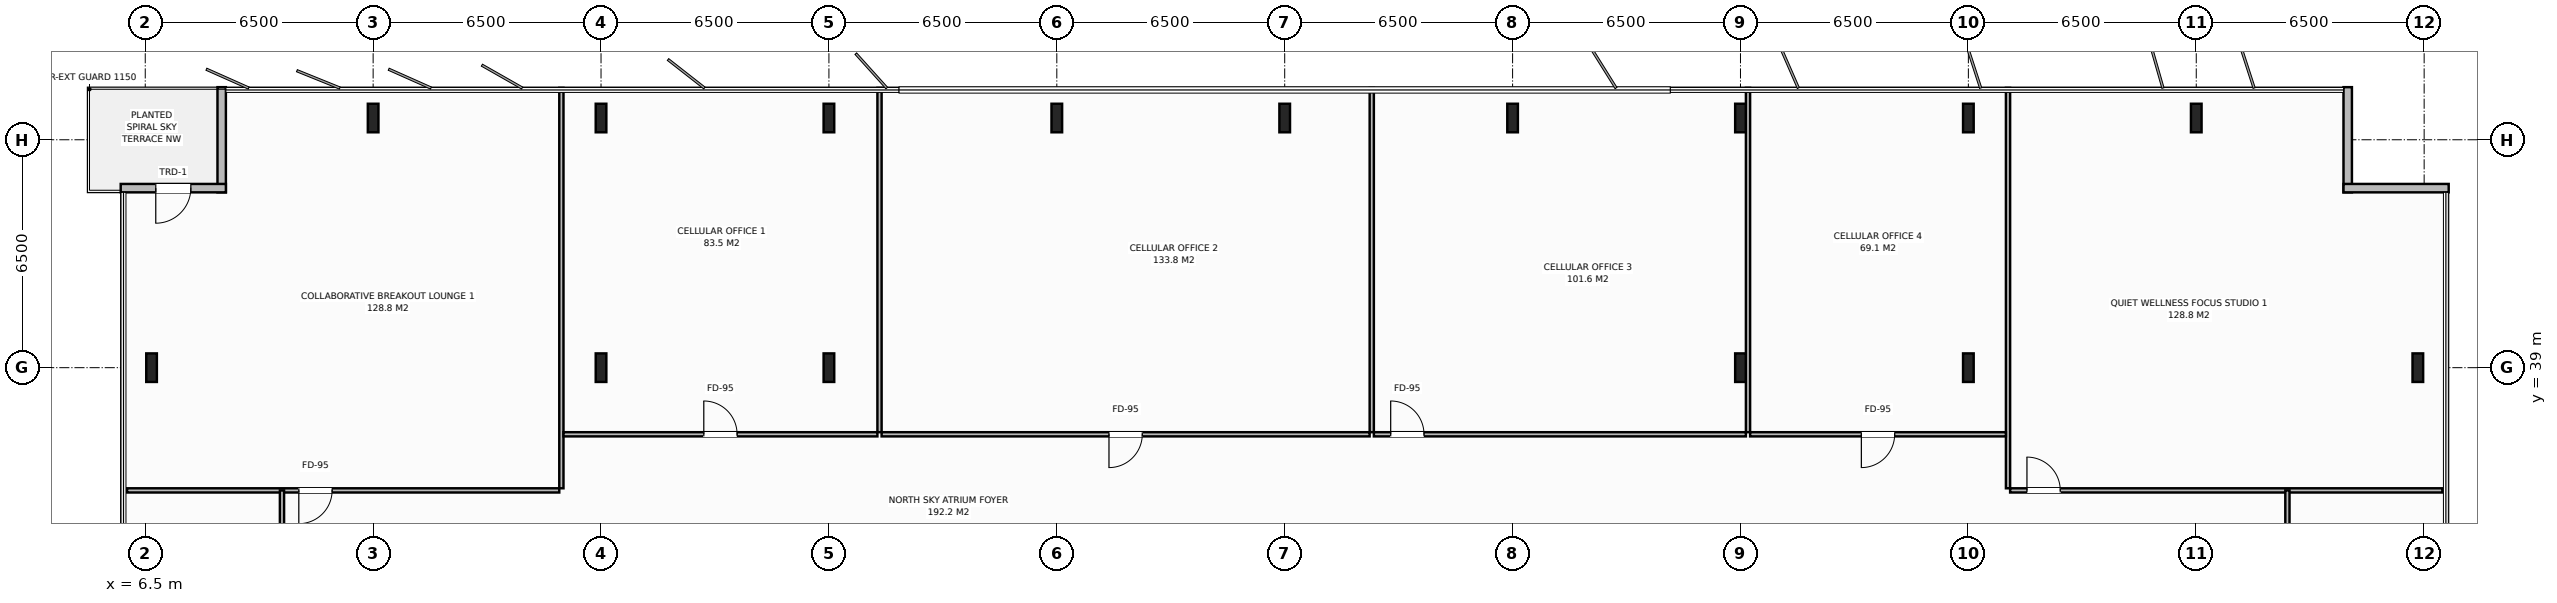
"""IFC4 building model, lengths in metres.
Left out: names, types, materials, properties, quantities, classifications, styles, units other than length and angle.
Written with IfcOpenShell. Run it as: python <this file> out.ifc"""

import sys

from ifc_helpers import new_model, si_unit, direction, frame, frame_2d, origin, origin_2d, place, context, subcontext, project, spatial, rectangle, i_section, extrude, element, fill, save


model = new_model("IFC4")
c1 = context("Model", 3, precision=1e-05, world=origin(), true_north=direction((0.0, 1.0)))
c2 = subcontext(c1, "Body", "Model", "MODEL_VIEW")
j1 = project(units=[si_unit("LENGTHUNIT", "METRE"), si_unit("PLANEANGLEUNIT", "RADIAN")], contexts=[c1])
p1 = place(None, origin())
s1 = spatial("IfcSite", under=j1, at=p1, CompositionType="ELEMENT")
p2 = place(p1, origin())
s2 = spatial("IfcBuilding", under=s1, at=p2, CompositionType="ELEMENT")
p3 = place(p2, frame((0.0, 0.0, 213.8)))
s3 = spatial("IfcBuildingStorey", under=s2, at=p3, CompositionType="ELEMENT", Elevation=213.8)
for number, where, z_axis, x_axis in (
    (1, (19.5, 39.0, 0.0), (0.0, 0.0, 1.0), (1.0, 0.0, 0.0)),
    (2, (58.5, 39.0, 0.0), (0.0, 0.0, 1.0), (1.0, 0.0, 0.0)),
    (3, (26.0, 39.0, 0.0), (0.0, 0.0, 1.0), (1.0, 0.0, 0.0)),
    (4, (52.0, 39.0, 0.0), (0.0, 0.0, 1.0), (1.0, 0.0, 0.0)),
    (5, (13.0, 46.12, 0.0), (0.0, 0.0, 1.0), (1.0, 0.0, 0.0)),
    (6, (19.5, 46.12, 0.0), (0.0, 0.0, 1.0), (1.0, 0.0, 0.0)),
    (7, (26.0, 46.12, 0.0), (0.0, 0.0, 1.0), (1.0, 0.0, 0.0)),
    (8, (32.5, 46.12, 0.0), (0.0, 0.0, 1.0), (1.0, 0.0, 0.0)),
    (9, (39.0, 46.12, 0.0), (0.0, 0.0, 1.0), (1.0, 0.0, 0.0)),
    (10, (45.5, 46.12, 0.0), (0.0, 0.0, 1.0), (1.0, 0.0, 0.0)),
    (11, (52.0, 46.12, 0.0), (0.0, 0.0, 1.0), (1.0, 0.0, 0.0)),
    (12, (58.5, 46.12, 0.0), (0.0, 0.0, 1.0), (1.0, 0.0, 0.0)),
    (13, (65.0, 46.12, 0.0), (0.0, 0.0, 1.0), (1.0, 0.0, 0.0)),
    (14, (6.68, 39.0, 0.0), (0.0, 0.0, 1.0), (1.0, 0.0, 0.0)),
    (15, (71.32, 39.0, 0.0), (0.0, 0.0, 1.0), (1.0, 0.0, 0.0)),
):
    element("IfcColumn", number, at=place(p3, frame(where, z_axis=z_axis, x_axis=x_axis)), inside=s3, PredefinedType="COLUMN", context=c2, shape_type="SweptSolid", body=[
        extrude(i_section(OverallWidth=0.303, OverallDepth=0.814, WebThickness=0.021, FlangeThickness=0.04, at=origin_2d()), origin(), (0.0, 0.0, 1.0), 3.8),
    ])
p4 = place(p3, frame((8.68, 44.0, 0.0), z_axis=(0.0, 0.0, 1.0), x_axis=(0.0, 1.0, 0.0)))
e16 = element("IfcWall", 16, at=p4, inside=s3, PredefinedType="STANDARD", context=c2, shape_type="SweptSolid", body=[
    extrude(rectangle(XDim=3.0, YDim=0.24, at=frame_2d((1.5, 0.0))), origin(), (0.0, 0.0, 1.0), 3.58),
])
p5 = place(p3, frame((5.8, 44.12, 0.0), z_axis=(0.0, 0.0, 1.0), x_axis=(1.0, 0.0, 0.0)))
e17 = element("IfcWall", 17, at=p5, inside=s3, PredefinedType="STANDARD", context=c2, shape_type="SweptSolid", body=[
    extrude(rectangle(XDim=3.0, YDim=0.24, at=frame_2d((1.5, 0.0))), origin(), (0.0, 0.0, 1.0), 3.58),
])
p6 = place(p5, frame((1.0, 0.0, 0.0)))
e18 = element("IfcOpeningElement", 18, at=p6, cuts=e17, PredefinedType="OPENING", context=c2, shape_type="SweptSolid", body=[
    extrude(rectangle(XDim=1.0, YDim=2.2, at=frame_2d((0.5, 1.1))), frame((0.0, 0.13, 0.0), z_axis=(0.0, -1.0, 0.0), x_axis=(1.0, 0.0, 0.0)), (0.0, 0.0, 1.0), 0.26),
])
for number, where, z_axis, x_axis in (
    (19, (69.32, 47.0, 0.0), (0.0, 0.0, 1.0), (0.0, -1.0, 0.0)),
    (20, (69.2, 44.12, 0.0), (0.0, 0.0, 1.0), (1.0, 0.0, 0.0)),
):
    element("IfcWall", number, at=place(p3, frame(where, z_axis=z_axis, x_axis=x_axis)), inside=s3, PredefinedType="STANDARD", context=c2, shape_type="SweptSolid", body=[
        extrude(rectangle(XDim=3.0, YDim=0.24, at=frame_2d((1.5, 0.0))), origin(), (0.0, 0.0, 1.0), 3.58),
    ])
p7 = place(p3, frame((18.369, 35.56, 0.0), z_axis=(0.0, 0.0, 1.0), x_axis=(0.0, 1.0, 0.0)))
e21 = element("IfcWall", 21, at=p7, inside=s3, PredefinedType="PARTITIONING", context=c2, shape_type="SweptSolid", body=[
    extrude(rectangle(XDim=11.42, YDim=0.12, at=frame_2d((5.71, 0.0))), origin(), (0.0, 0.0, 1.0), 3.58),
])
p8 = place(p3, frame((5.98, 35.5, 0.0), z_axis=(0.0, 0.0, 1.0), x_axis=(1.0, 0.0, 0.0)))
e22 = element("IfcWall", 22, at=p8, inside=s3, PredefinedType="PARTITIONING", context=c2, shape_type="SweptSolid", body=[
    extrude(rectangle(XDim=12.329, YDim=0.12, at=frame_2d((6.165, 0.0))), origin(), (0.0, 0.0, 1.0), 3.58),
])
p9 = place(p8, frame((4.9, 0.0, 0.0)))
e23 = element("IfcOpeningElement", 23, at=p9, cuts=e22, PredefinedType="OPENING", context=c2, shape_type="SweptSolid", body=[
    extrude(rectangle(XDim=0.95, YDim=2.15, at=frame_2d((0.475, 1.075))), frame((0.0, 0.07, 0.0), z_axis=(0.0, -1.0, 0.0), x_axis=(1.0, 0.0, 0.0)), (0.0, 0.0, 1.0), 0.14),
])
p10 = place(p3, frame((27.443, 37.16, 0.0), z_axis=(0.0, 0.0, 1.0), x_axis=(0.0, 1.0, 0.0)))
e24 = element("IfcWall", 24, at=p10, inside=s3, PredefinedType="PARTITIONING", context=c2, shape_type="SweptSolid", body=[
    extrude(rectangle(XDim=9.82, YDim=0.12, at=frame_2d((4.91, 0.0))), origin(), (0.0, 0.0, 1.0), 3.58),
])
p11 = place(p3, frame((18.429, 37.1, 0.0), z_axis=(0.0, 0.0, 1.0), x_axis=(1.0, 0.0, 0.0)))
e25 = element("IfcWall", 25, at=p11, inside=s3, PredefinedType="PARTITIONING", context=c2, shape_type="SweptSolid", body=[
    extrude(rectangle(XDim=8.954, YDim=0.12, at=frame_2d((4.477, 0.0))), origin(), (0.0, 0.0, 1.0), 3.58),
])
p12 = place(p11, frame((4.002, 0.0, 0.0)))
e26 = element("IfcOpeningElement", 26, at=p12, cuts=e25, PredefinedType="OPENING", context=c2, shape_type="SweptSolid", body=[
    extrude(rectangle(XDim=0.95, YDim=2.15, at=frame_2d((0.475, 1.075))), frame((0.0, 0.07, 0.0), z_axis=(0.0, -1.0, 0.0), x_axis=(1.0, 0.0, 0.0)), (0.0, 0.0, 1.0), 0.14),
])
p13 = place(p3, frame((41.483, 37.16, 0.0), z_axis=(0.0, 0.0, 1.0), x_axis=(0.0, 1.0, 0.0)))
e27 = element("IfcWall", 27, at=p13, inside=s3, PredefinedType="PARTITIONING", context=c2, shape_type="SweptSolid", body=[
    extrude(rectangle(XDim=9.82, YDim=0.12, at=frame_2d((4.91, 0.0))), origin(), (0.0, 0.0, 1.0), 3.58),
])
p14 = place(p3, frame((27.503, 37.1, 0.0), z_axis=(0.0, 0.0, 1.0), x_axis=(1.0, 0.0, 0.0)))
e28 = element("IfcWall", 28, at=p14, inside=s3, PredefinedType="PARTITIONING", context=c2, shape_type="SweptSolid", body=[
    extrude(rectangle(XDim=13.92, YDim=0.12, at=frame_2d((6.96, 0.0))), origin(), (0.0, 0.0, 1.0), 3.58),
])
p15 = place(p14, frame((6.485, 0.0, 0.0)))
e29 = element("IfcOpeningElement", 29, at=p15, cuts=e28, PredefinedType="OPENING", context=c2, shape_type="SweptSolid", body=[
    extrude(rectangle(XDim=0.95, YDim=2.15, at=frame_2d((0.475, 1.075))), frame((0.0, 0.07, 0.0), z_axis=(0.0, -1.0, 0.0), x_axis=(1.0, 0.0, 0.0)), (0.0, 0.0, 1.0), 0.14),
])
p16 = place(p3, frame((52.215, 37.16, 0.0), z_axis=(0.0, 0.0, 1.0), x_axis=(0.0, 1.0, 0.0)))
e30 = element("IfcWall", 30, at=p16, inside=s3, PredefinedType="PARTITIONING", context=c2, shape_type="SweptSolid", body=[
    extrude(rectangle(XDim=9.82, YDim=0.12, at=frame_2d((4.91, 0.0))), origin(), (0.0, 0.0, 1.0), 2.88),
])
p17 = place(p3, frame((41.543, 37.1, 0.0), z_axis=(0.0, 0.0, 1.0), x_axis=(1.0, 0.0, 0.0)))
e31 = element("IfcWall", 31, at=p17, inside=s3, PredefinedType="PARTITIONING", context=c2, shape_type="SweptSolid", body=[
    extrude(rectangle(XDim=10.611, YDim=0.12, at=frame_2d((5.306, 0.0))), origin(), (0.0, 0.0, 1.0), 3.58),
])
p18 = place(p17, frame((0.48, 0.0, 0.0)))
e32 = element("IfcOpeningElement", 32, at=p18, cuts=e31, PredefinedType="OPENING", context=c2, shape_type="SweptSolid", body=[
    extrude(rectangle(XDim=0.95, YDim=2.15, at=frame_2d((0.475, 1.075))), frame((0.0, 0.07, 0.0), z_axis=(0.0, -1.0, 0.0), x_axis=(1.0, 0.0, 0.0)), (0.0, 0.0, 1.0), 0.14),
])
p19 = place(p3, frame((59.631, 35.56, 0.0), z_axis=(0.0, 0.0, 1.0), x_axis=(0.0, 1.0, 0.0)))
e33 = element("IfcWall", 33, at=p19, inside=s3, PredefinedType="PARTITIONING", context=c2, shape_type="SweptSolid", body=[
    extrude(rectangle(XDim=11.42, YDim=0.12, at=frame_2d((5.71, 0.0))), origin(), (0.0, 0.0, 1.0), 3.58),
])
p20 = place(p3, frame((52.275, 37.1, 0.0), z_axis=(0.0, 0.0, 1.0), x_axis=(1.0, 0.0, 0.0)))
e34 = element("IfcWall", 34, at=p20, inside=s3, PredefinedType="PARTITIONING", context=c2, shape_type="SweptSolid", body=[
    extrude(rectangle(XDim=7.296, YDim=0.12, at=frame_2d((3.648, 0.0))), origin(), (0.0, 0.0, 1.0), 3.58),
])
p21 = place(p20, frame((3.173, 0.0, 0.0)))
e35 = element("IfcOpeningElement", 35, at=p21, cuts=e34, PredefinedType="OPENING", context=c2, shape_type="SweptSolid", body=[
    extrude(rectangle(XDim=0.95, YDim=2.15, at=frame_2d((0.475, 1.075))), frame((0.0, 0.07, 0.0), z_axis=(0.0, -1.0, 0.0), x_axis=(1.0, 0.0, 0.0)), (0.0, 0.0, 1.0), 0.14),
])
p22 = place(p3, frame((59.691, 35.5, 0.0), z_axis=(0.0, 0.0, 1.0), x_axis=(1.0, 0.0, 0.0)))
e36 = element("IfcWall", 36, at=p22, inside=s3, PredefinedType="PARTITIONING", context=c2, shape_type="SweptSolid", body=[
    extrude(rectangle(XDim=12.329, YDim=0.12, at=frame_2d((6.165, 0.0))), origin(), (0.0, 0.0, 1.0), 3.58),
])
p23 = place(p22, frame((0.48, 0.0, 0.0)))
e37 = element("IfcOpeningElement", 37, at=p23, cuts=e36, PredefinedType="OPENING", context=c2, shape_type="SweptSolid", body=[
    extrude(rectangle(XDim=0.95, YDim=2.15, at=frame_2d((0.475, 1.075))), frame((0.0, 0.07, 0.0), z_axis=(0.0, -1.0, 0.0), x_axis=(1.0, 0.0, 0.0)), (0.0, 0.0, 1.0), 0.14),
])
p24 = place(p3, frame((10.4, 27.05, 0.0), z_axis=(0.0, 0.0, 1.0), x_axis=(0.0, 1.0, 0.0)))
e38 = element("IfcWall", 38, at=p24, inside=s3, PredefinedType="PARTITIONING", context=c2, shape_type="SweptSolid", body=[
    extrude(rectangle(XDim=8.45, YDim=0.12, at=frame_2d((4.225, 0.0))), origin(), (0.0, 0.0, 1.0), 3.58),
])
p25 = place(p24, frame((2.7, 0.0, 0.0)))
e39 = element("IfcOpeningElement", 39, at=p25, cuts=e38, PredefinedType="OPENING", context=c2, shape_type="SweptSolid", body=[
    extrude(rectangle(XDim=0.95, YDim=2.15, at=frame_2d((0.475, 1.075))), frame((0.0, 0.07, 0.0), z_axis=(0.0, -1.0, 0.0), x_axis=(1.0, 0.0, 0.0)), (0.0, 0.0, 1.0), 0.14),
])
p26 = place(p3, frame((67.6, 16.5, 0.0), z_axis=(0.0, 0.0, 1.0), x_axis=(0.0, 1.0, 0.0)))
e40 = element("IfcWall", 40, at=p26, inside=s3, PredefinedType="PARTITIONING", context=c2, shape_type="SweptSolid", body=[
    extrude(rectangle(XDim=19.0, YDim=0.12, at=frame_2d((9.5, 0.0))), origin(), (0.0, 0.0, 1.0), 3.58),
])
p27 = place(p26, frame((9.025, 0.0, 0.0)))
e41 = element("IfcOpeningElement", 41, at=p27, cuts=e40, PredefinedType="OPENING", context=c2, shape_type="SweptSolid", body=[
    extrude(rectangle(XDim=0.95, YDim=2.15, at=frame_2d((0.475, 1.075))), frame((0.0, 0.07, 0.0), z_axis=(0.0, -1.0, 0.0), x_axis=(1.0, 0.0, 0.0)), (0.0, 0.0, 1.0), 0.14),
])
p28 = place(p6, origin())
e42 = element("IfcDoor", 42, at=p28, inside=s3, OperationType="SINGLE_SWING_RIGHT", PredefinedType="DOOR", context=c2, shape_type="SweptSolid", body=[
    extrude(rectangle(XDim=1.0, YDim=2.2, at=frame_2d((0.5, 1.1))), frame((0.0, 0.025, 0.0), z_axis=(0.0, -1.0, 0.0), x_axis=(1.0, 0.0, 0.0)), (0.0, 0.0, 1.0), 0.05),
])
fill(e18, e42)
p29 = place(p9, origin())
e43 = element("IfcDoor", 43, at=p29, inside=s3, OperationType="SINGLE_SWING_RIGHT", PredefinedType="DOOR", context=c2, shape_type="SweptSolid", body=[
    extrude(rectangle(XDim=0.95, YDim=2.15, at=frame_2d((0.475, 1.075))), frame((0.0, 0.025, 0.0), z_axis=(0.0, -1.0, 0.0), x_axis=(1.0, 0.0, 0.0)), (0.0, 0.0, 1.0), 0.05),
])
fill(e23, e43)
p30 = place(p12, origin())
e44 = element("IfcDoor", 44, at=p30, inside=s3, OperationType="SINGLE_SWING_LEFT", PredefinedType="DOOR", context=c2, shape_type="SweptSolid", body=[
    extrude(rectangle(XDim=0.95, YDim=2.15, at=frame_2d((0.475, 1.075))), frame((0.0, 0.025, 0.0), z_axis=(0.0, -1.0, 0.0), x_axis=(1.0, 0.0, 0.0)), (0.0, 0.0, 1.0), 0.05),
])
fill(e26, e44)
p31 = place(p15, origin())
e45 = element("IfcDoor", 45, at=p31, inside=s3, OperationType="SINGLE_SWING_RIGHT", PredefinedType="DOOR", context=c2, shape_type="SweptSolid", body=[
    extrude(rectangle(XDim=0.95, YDim=2.15, at=frame_2d((0.475, 1.075))), frame((0.0, 0.025, 0.0), z_axis=(0.0, -1.0, 0.0), x_axis=(1.0, 0.0, 0.0)), (0.0, 0.0, 1.0), 0.05),
])
fill(e29, e45)
p32 = place(p18, origin())
e46 = element("IfcDoor", 46, at=p32, inside=s3, OperationType="SINGLE_SWING_LEFT", PredefinedType="DOOR", context=c2, shape_type="SweptSolid", body=[
    extrude(rectangle(XDim=0.95, YDim=2.15, at=frame_2d((0.475, 1.075))), frame((0.0, 0.025, 0.0), z_axis=(0.0, -1.0, 0.0), x_axis=(1.0, 0.0, 0.0)), (0.0, 0.0, 1.0), 0.05),
])
fill(e32, e46)
p33 = place(p21, origin())
e47 = element("IfcDoor", 47, at=p33, inside=s3, OperationType="SINGLE_SWING_RIGHT", PredefinedType="DOOR", context=c2, shape_type="SweptSolid", body=[
    extrude(rectangle(XDim=0.95, YDim=2.15, at=frame_2d((0.475, 1.075))), frame((0.0, 0.025, 0.0), z_axis=(0.0, -1.0, 0.0), x_axis=(1.0, 0.0, 0.0)), (0.0, 0.0, 1.0), 0.05),
])
fill(e35, e47)
p34 = place(p23, origin())
e48 = element("IfcDoor", 48, at=p34, inside=s3, OperationType="SINGLE_SWING_LEFT", PredefinedType="DOOR", context=c2, shape_type="SweptSolid", body=[
    extrude(rectangle(XDim=0.95, YDim=2.15, at=frame_2d((0.475, 1.075))), frame((0.0, 0.025, 0.0), z_axis=(0.0, -1.0, 0.0), x_axis=(1.0, 0.0, 0.0)), (0.0, 0.0, 1.0), 0.05),
])
fill(e37, e48)
save(model, sys.argv[1])
